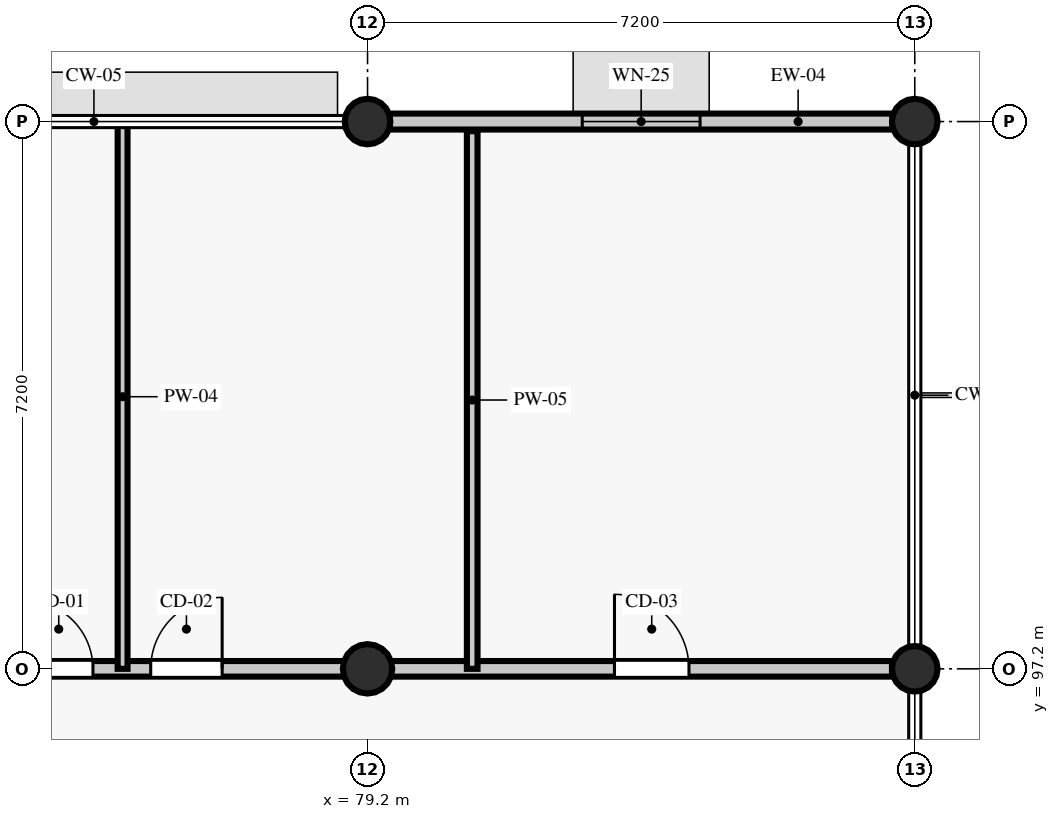
"""IFC4 building model, lengths in metres.
Left out: names, types, materials, properties, quantities, classifications, styles, units other than length and angle.
Written with IfcOpenShell. Run it as: python <this file> out.ifc"""

import sys

from ifc_helpers import new_model, si_unit, direction, frame, frame_2d, origin, origin_2d, place, context, subcontext, project, spatial, rectangle, circle, extrude, element, fill, save


model = new_model("IFC4")
c1 = context("Model", 3, precision=1e-05, world=origin(), true_north=direction((0.0, 1.0)))
c2 = subcontext(c1, "Body", "Model", "MODEL_VIEW")
j1 = project(units=[si_unit("LENGTHUNIT", "METRE"), si_unit("PLANEANGLEUNIT", "RADIAN")], contexts=[c1])
p1 = place(None, origin())
s1 = spatial("IfcSite", under=j1, at=p1, CompositionType="ELEMENT")
p2 = place(p1, origin())
s2 = spatial("IfcBuilding", under=s1, at=p2, CompositionType="ELEMENT")
p3 = place(p2, frame((0.0, 0.0, 9.6)))
s3 = spatial("IfcBuildingStorey", under=s2, at=p3, CompositionType="ELEMENT", Elevation=9.6)
p4 = place(p3, frame((79.2, 97.2, 0.0), z_axis=(0.0, 0.0, 1.0), x_axis=(1.0, 0.0, 0.0)))
e1 = element("IfcColumn", 1, at=p4, inside=s3, PredefinedType="COLUMN", context=c2, shape_type="SweptSolid", body=[
    extrude(circle(Radius=0.325, at=origin_2d()), origin(), (0.0, 0.0, 1.0), 3.95),
])
for number, where, z_axis, x_axis in (
    (2, (79.2, 104.4, 0.0), (0.0, 0.0, 1.0), (1.0, 0.0, 0.0)),
    (3, (86.4, 97.2, 0.0), (0.0, 0.0, 1.0), (1.0, 0.0, 0.0)),
    (4, (86.4, 104.4, 0.0), (0.0, 0.0, 1.0), (1.0, 0.0, 0.0)),
):
    element("IfcColumn", number, at=place(p3, frame(where, z_axis=z_axis, x_axis=x_axis)), inside=s3, PredefinedType="COLUMN", context=c2, shape_type="SweptSolid", body=[
        extrude(circle(Radius=0.3, at=origin_2d()), origin(), (0.0, 0.0, 1.0), 3.95),
    ])
p5 = place(p3, frame((86.105, 104.4, 0.0), z_axis=(0.0, 0.0, 1.0), x_axis=(-1.0, 0.0, 0.0)))
e5 = element("IfcWall", 5, at=p5, inside=s3, PredefinedType="STANDARD", context=c2, shape_type="SweptSolid", body=[
    extrude(rectangle(XDim=6.61, YDim=0.21, at=frame_2d((3.305, 0.0))), origin(), (0.0, 0.0, 1.0), 3.3),
])
p6 = place(p5, frame((2.53, 0.0, 0.9)))
e6 = element("IfcOpeningElement", 6, at=p6, cuts=e5, PredefinedType="OPENING", context=c2, shape_type="SweptSolid", body=[
    extrude(rectangle(XDim=1.55, YDim=1.54, at=frame_2d((0.775, 0.77))), frame((0.0, 0.115, 0.0), z_axis=(0.0, -1.0, 0.0), x_axis=(1.0, 0.0, 0.0)), (0.0, 0.0, 1.0), 0.23),
])
p7 = place(p3, frame((50.7, 97.2, 0.0), z_axis=(0.0, 0.0, 1.0), x_axis=(1.0, 0.0, 0.0)))
e7 = element("IfcWall", 7, at=p7, inside=s3, PredefinedType="PARTITIONING", context=c2, shape_type="SweptSolid", body=[
    extrude(rectangle(XDim=35.4, YDim=0.205, at=frame_2d((17.7, 0.0))), origin(), (0.0, 0.0, 1.0), 3.2),
])
p8 = place(p7, frame((2.873, 0.0, 0.0)))
e8 = element("IfcOpeningElement", 8, at=p8, cuts=e7, PredefinedType="OPENING", context=c2, shape_type="SweptSolid", body=[
    extrude(rectangle(XDim=1.18, YDim=2.18, at=frame_2d((0.59, 1.09))), frame((0.0, 0.113, 0.0), z_axis=(0.0, -1.0, 0.0), x_axis=(1.0, 0.0, 0.0)), (0.0, 0.0, 1.0), 0.225),
])
p9 = place(p7, frame((9.816, 0.0, 0.0)))
e9 = element("IfcOpeningElement", 9, at=p9, cuts=e7, PredefinedType="OPENING", context=c2, shape_type="SweptSolid", body=[
    extrude(rectangle(XDim=0.96, YDim=2.23, at=frame_2d((0.48, 1.115))), frame((0.0, 0.113, 0.0), z_axis=(0.0, -1.0, 0.0), x_axis=(1.0, 0.0, 0.0)), (0.0, 0.0, 1.0), 0.225),
])
p10 = place(p7, frame((15.09, 0.0, 0.0)))
e10 = element("IfcOpeningElement", 10, at=p10, cuts=e7, PredefinedType="OPENING", context=c2, shape_type="SweptSolid", body=[
    extrude(rectangle(XDim=0.9, YDim=2.13, at=frame_2d((0.45, 1.065))), frame((0.0, 0.113, 0.0), z_axis=(0.0, -1.0, 0.0), x_axis=(1.0, 0.0, 0.0)), (0.0, 0.0, 1.0), 0.225),
])
p11 = place(p7, frame((17.25, 0.0, 0.0)))
e11 = element("IfcOpeningElement", 11, at=p11, cuts=e7, PredefinedType="OPENING", context=c2, shape_type="SweptSolid", body=[
    extrude(rectangle(XDim=0.92, YDim=2.18, at=frame_2d((0.46, 1.09))), frame((0.0, 0.113, 0.0), z_axis=(0.0, -1.0, 0.0), x_axis=(1.0, 0.0, 0.0)), (0.0, 0.0, 1.0), 0.225),
])
p12 = place(p7, frame((19.47, 0.0, 0.0)))
e12 = element("IfcOpeningElement", 12, at=p12, cuts=e7, PredefinedType="OPENING", context=c2, shape_type="SweptSolid", body=[
    extrude(rectangle(XDim=0.94, YDim=2.08, at=frame_2d((0.47, 1.04))), frame((0.0, 0.113, 0.0), z_axis=(0.0, -1.0, 0.0), x_axis=(1.0, 0.0, 0.0)), (0.0, 0.0, 1.0), 0.225),
])
p13 = place(p7, frame((23.987, 0.0, 0.0)))
e13 = element("IfcOpeningElement", 13, at=p13, cuts=e7, PredefinedType="OPENING", context=c2, shape_type="SweptSolid", body=[
    extrude(rectangle(XDim=0.9, YDim=2.08, at=frame_2d((0.45, 1.04))), frame((0.0, 0.113, 0.0), z_axis=(0.0, -1.0, 0.0), x_axis=(1.0, 0.0, 0.0)), (0.0, 0.0, 1.0), 0.225),
])
p14 = place(p7, frame((25.647, 0.0, 0.0)))
e14 = element("IfcOpeningElement", 14, at=p14, cuts=e7, PredefinedType="OPENING", context=c2, shape_type="SweptSolid", body=[
    extrude(rectangle(XDim=0.94, YDim=2.08, at=frame_2d((0.47, 1.04))), frame((0.0, 0.113, 0.0), z_axis=(0.0, -1.0, 0.0), x_axis=(1.0, 0.0, 0.0)), (0.0, 0.0, 1.0), 0.225),
])
p15 = place(p7, frame((31.749, 0.0, 0.0)))
e15 = element("IfcOpeningElement", 15, at=p15, cuts=e7, PredefinedType="OPENING", context=c2, shape_type="SweptSolid", body=[
    extrude(rectangle(XDim=0.98, YDim=2.08, at=frame_2d((0.49, 1.04))), frame((0.0, 0.113, 0.0), z_axis=(0.0, -1.0, 0.0), x_axis=(1.0, 0.0, 0.0)), (0.0, 0.0, 1.0), 0.225),
])
p16 = place(p3, frame((75.977, 97.2, 0.0), z_axis=(0.0, 0.0, 1.0), x_axis=(0.0, 1.0, 0.0)))
e16 = element("IfcWall", 16, at=p16, inside=s3, PredefinedType="PARTITIONING", context=c2, shape_type="SweptSolid", body=[
    extrude(rectangle(XDim=7.16, YDim=0.13, at=frame_2d((3.58, 0.0))), origin(), (0.0, 0.0, 1.0), 3.2),
])
p17 = place(p3, frame((80.577, 97.2, 0.0), z_axis=(0.0, 0.0, 1.0), x_axis=(0.0, 1.0, 0.0)))
e17 = element("IfcWall", 17, at=p17, inside=s3, PredefinedType="PARTITIONING", context=c2, shape_type="SweptSolid", body=[
    extrude(rectangle(XDim=7.073, YDim=0.14, at=frame_2d((3.537, 0.0))), origin(), (0.0, 0.0, 1.0), 3.2),
])
p18 = place(p6, origin())
e18 = element("IfcWindow", 18, at=p18, inside=s3, PartitioningType="SINGLE_PANEL", PredefinedType="WINDOW", context=c2, shape_type="SweptSolid", body=[
    extrude(rectangle(XDim=1.55, YDim=1.54, at=frame_2d((0.775, 0.77))), frame((0.0, 0.03, 0.0), z_axis=(0.0, -1.0, 0.0), x_axis=(1.0, 0.0, 0.0)), (0.0, 0.0, 1.0), 0.06),
])
fill(e6, e18)
p19 = place(p13, origin())
e19 = element("IfcDoor", 19, at=p19, inside=s3, OperationType="SINGLE_SWING_LEFT", PredefinedType="DOOR", context=c2, shape_type="SweptSolid", body=[
    extrude(rectangle(XDim=0.9, YDim=2.08, at=frame_2d((0.45, 1.04))), frame((0.0, 0.025, 0.0), z_axis=(0.0, -1.0, 0.0), x_axis=(1.0, 0.0, 0.0)), (0.0, 0.0, 1.0), 0.05),
])
fill(e13, e19)
p20 = place(p14, origin())
e20 = element("IfcDoor", 20, at=p20, inside=s3, OperationType="SINGLE_SWING_RIGHT", PredefinedType="DOOR", context=c2, shape_type="SweptSolid", body=[
    extrude(rectangle(XDim=0.94, YDim=2.08, at=frame_2d((0.47, 1.04))), frame((0.0, 0.025, 0.0), z_axis=(0.0, -1.0, 0.0), x_axis=(1.0, 0.0, 0.0)), (0.0, 0.0, 1.0), 0.05),
])
fill(e14, e20)
p21 = place(p15, origin())
e21 = element("IfcDoor", 21, at=p21, inside=s3, OperationType="SINGLE_SWING_LEFT", PredefinedType="DOOR", context=c2, shape_type="SweptSolid", body=[
    extrude(rectangle(XDim=0.98, YDim=2.08, at=frame_2d((0.49, 1.04))), frame((0.0, 0.025, 0.0), z_axis=(0.0, -1.0, 0.0), x_axis=(1.0, 0.0, 0.0)), (0.0, 0.0, 1.0), 0.05),
])
fill(e15, e21)
save(model, sys.argv[1])
